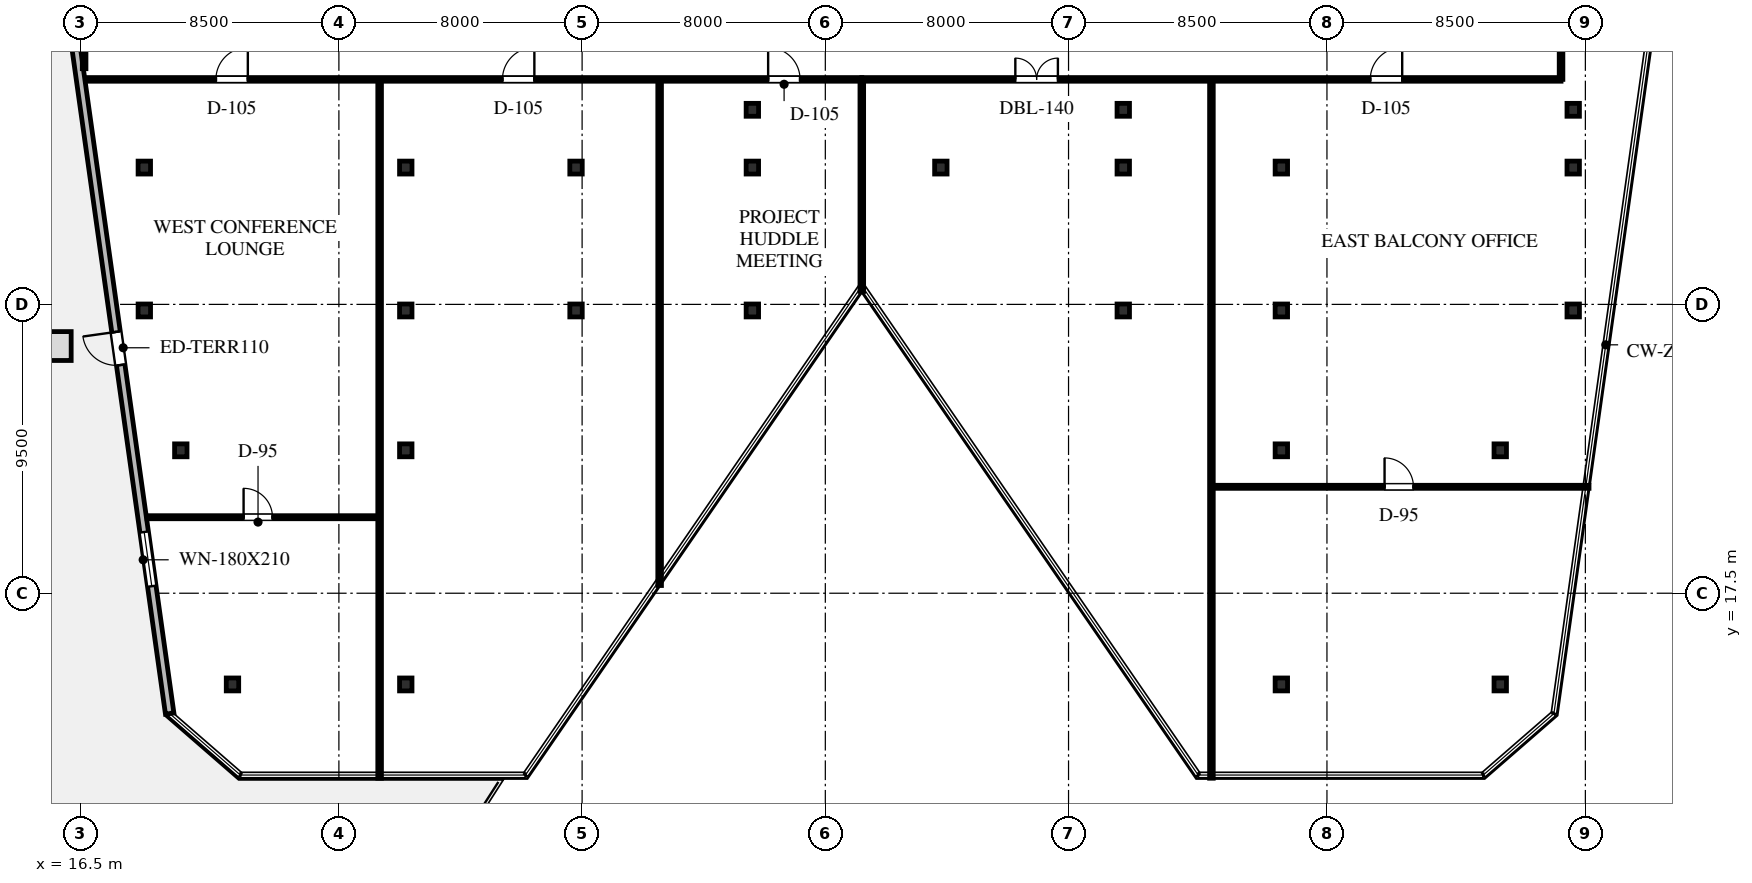
"""IFC4 building model, lengths in metres.
Left out: names, types, materials, properties, quantities, classifications, styles, units other than length and angle.
Written with IfcOpenShell. Run it as: python <this file> out.ifc"""

import sys

from ifc_helpers import new_model, si_unit, direction, frame, frame_2d, origin, origin_2d, place, context, subcontext, project, spatial, rectangle, i_section, extrude, element, fill, save


model = new_model("IFC4")
c1 = context("Model", 3, precision=1e-05, world=origin(), true_north=direction((0.0, 1.0)))
c2 = subcontext(c1, "Body", "Model", "MODEL_VIEW")
j1 = project(units=[si_unit("LENGTHUNIT", "METRE"), si_unit("PLANEANGLEUNIT", "RADIAN")], contexts=[c1])
p1 = place(None, origin())
s1 = spatial("IfcSite", under=j1, at=p1, CompositionType="ELEMENT")
p2 = place(p1, origin())
s2 = spatial("IfcBuilding", under=s1, at=p2, CompositionType="ELEMENT")
p3 = place(p2, frame((0.0, 0.0, 160.5)))
s3 = spatial("IfcBuildingStorey", under=s2, at=p3, CompositionType="ELEMENT", Elevation=160.5)
for number, where, z_axis, x_axis in (
    (1, (21.5, 14.5, 0.0), (0.0, 0.0, 1.0), (1.0, 0.0, 0.0)),
    (2, (18.6, 26.8, 0.0), (0.0, 0.0, 1.0), (1.0, 0.0, 0.0)),
    (3, (27.2, 26.8, 0.0), (0.0, 0.0, 1.0), (1.0, 0.0, 0.0)),
    (4, (32.8, 26.8, 0.0), (0.0, 0.0, 1.0), (1.0, 0.0, 0.0)),
    (5, (38.6, 26.8, 0.0), (0.0, 0.0, 1.0), (1.0, 0.0, 0.0)),
    (6, (50.8, 26.8, 0.0), (0.0, 0.0, 1.0), (1.0, 0.0, 0.0)),
    (7, (56.0, 26.8, 0.0), (0.0, 0.0, 1.0), (1.0, 0.0, 0.0)),
    (8, (65.6, 26.8, 0.0), (0.0, 0.0, 1.0), (1.0, 0.0, 0.0)),
    (9, (18.6, 31.5, 0.0), (0.0, 0.0, 1.0), (1.0, 0.0, 0.0)),
    (10, (27.2, 31.5, 0.0), (0.0, 0.0, 1.0), (1.0, 0.0, 0.0)),
    (11, (32.8, 31.5, 0.0), (0.0, 0.0, 1.0), (1.0, 0.0, 0.0)),
    (12, (27.2, 14.5, 0.0), (0.0, 0.0, 1.0), (1.0, 0.0, 0.0)),
    (13, (38.6, 31.5, 0.0), (0.0, 0.0, 1.0), (1.0, 0.0, 0.0)),
    (14, (44.8, 31.5, 0.0), (0.0, 0.0, 1.0), (1.0, 0.0, 0.0)),
    (15, (50.8, 31.5, 0.0), (0.0, 0.0, 1.0), (1.0, 0.0, 0.0)),
    (16, (56.0, 31.5, 0.0), (0.0, 0.0, 1.0), (1.0, 0.0, 0.0)),
    (17, (65.6, 31.5, 0.0), (0.0, 0.0, 1.0), (1.0, 0.0, 0.0)),
    (18, (56.0, 14.5, 0.0), (0.0, 0.0, 1.0), (1.0, 0.0, 0.0)),
    (19, (63.2, 14.5, 0.0), (0.0, 0.0, 1.0), (1.0, 0.0, 0.0)),
    (20, (19.8, 22.2, 0.0), (0.0, 0.0, 1.0), (1.0, 0.0, 0.0)),
    (21, (27.2, 22.2, 0.0), (0.0, 0.0, 1.0), (1.0, 0.0, 0.0)),
    (22, (56.0, 22.2, 0.0), (0.0, 0.0, 1.0), (1.0, 0.0, 0.0)),
    (23, (63.2, 22.2, 0.0), (0.0, 0.0, 1.0), (1.0, 0.0, 0.0)),
    (24, (38.6, 33.4, 0.0), (0.0, 0.0, 1.0), (1.0, 0.0, 0.0)),
    (25, (50.8, 33.4, 0.0), (0.0, 0.0, 1.0), (1.0, 0.0, 0.0)),
    (26, (65.6, 33.4, 0.0), (0.0, 0.0, 1.0), (1.0, 0.0, 0.0)),
):
    element("IfcColumn", number, at=place(p3, frame(where, z_axis=z_axis, x_axis=x_axis)), inside=s3, PredefinedType="COLUMN", context=c2, shape_type="SweptSolid", body=[
        extrude(i_section(OverallWidth=0.409, OverallDepth=0.425, WebThickness=0.033, FlangeThickness=0.052, FilletRadius=0.03, at=origin_2d()), origin(), (0.0, 0.0, 1.0), 4.0),
    ])
p4 = place(p3, frame((19.434, 13.541, 0.0), z_axis=(0.0, 0.0, 1.0), x_axis=(-0.139173290738, 0.99026804207, 0.0)))
e27 = element("IfcWall", 27, at=p4, inside=s3, PredefinedType="STANDARD", context=c2, shape_type="SweptSolid", body=[
    extrude(rectangle(XDim=24.498, YDim=0.28, at=frame_2d((12.249, 0.0))), origin(), (0.0, 0.0, 1.0), 3.755),
])
p5 = place(p4, frame((11.578, 0.0, 0.0)))
e28 = element("IfcOpeningElement", 28, at=p5, cuts=e27, PredefinedType="OPENING", context=c2, shape_type="SweptSolid", body=[
    extrude(rectangle(XDim=1.1, YDim=2.2, at=frame_2d((0.55, 1.1))), frame((0.0, 0.15, 0.0), z_axis=(0.0, -1.0, 0.0), x_axis=(1.0, 0.0, 0.0)), (0.0, 0.0, 1.0), 0.3),
])
p6 = place(p4, frame((4.231, 0.0, 0.65)))
e29 = element("IfcOpeningElement", 29, at=p6, cuts=e27, PredefinedType="OPENING", context=c2, shape_type="SweptSolid", body=[
    extrude(rectangle(XDim=1.8, YDim=2.1, at=frame_2d((0.9, 1.05))), frame((0.0, 0.15, 0.0), z_axis=(0.0, -1.0, 0.0), x_axis=(1.0, 0.0, 0.0)), (0.0, 0.0, 1.0), 0.3),
])
p7 = place(p3, frame((16.669, 34.4, 0.0), z_axis=(0.0, 0.0, 1.0), x_axis=(1.0, 0.0, 0.0)))
e30 = element("IfcWall", 30, at=p7, inside=s3, PredefinedType="PARTITIONING", context=c2, shape_type="SweptSolid", body=[
    extrude(rectangle(XDim=25.531, YDim=0.12, at=frame_2d((12.765, 0.0))), origin(), (0.0, 0.0, 1.0), 2.982),
])
p8 = place(p7, frame((4.285, 0.0, 0.0)))
e31 = element("IfcOpeningElement", 31, at=p8, cuts=e30, PredefinedType="OPENING", context=c2, shape_type="SweptSolid", body=[
    extrude(rectangle(XDim=1.05, YDim=2.2, at=frame_2d((0.525, 1.1))), frame((0.0, 0.07, 0.0), z_axis=(0.0, -1.0, 0.0), x_axis=(1.0, 0.0, 0.0)), (0.0, 0.0, 1.0), 0.14),
])
p9 = place(p7, frame((13.71, 0.0, 0.0)))
e32 = element("IfcOpeningElement", 32, at=p9, cuts=e30, PredefinedType="OPENING", context=c2, shape_type="SweptSolid", body=[
    extrude(rectangle(XDim=1.05, YDim=2.2, at=frame_2d((0.525, 1.1))), frame((0.0, 0.07, 0.0), z_axis=(0.0, -1.0, 0.0), x_axis=(1.0, 0.0, 0.0)), (0.0, 0.0, 1.0), 0.14),
])
p10 = place(p7, frame((22.449, 0.0, 0.0)))
e33 = element("IfcOpeningElement", 33, at=p10, cuts=e30, PredefinedType="OPENING", context=c2, shape_type="SweptSolid", body=[
    extrude(rectangle(XDim=1.05, YDim=2.2, at=frame_2d((0.525, 1.1))), frame((0.0, 0.07, 0.0), z_axis=(0.0, -1.0, 0.0), x_axis=(1.0, 0.0, 0.0)), (0.0, 0.0, 1.0), 0.14),
])
p11 = place(p3, frame((42.2, 34.4, 0.0), z_axis=(0.0, 0.0, 1.0), x_axis=(1.0, 0.0, 0.0)))
e34 = element("IfcWall", 34, at=p11, inside=s3, PredefinedType="PARTITIONING", context=c2, shape_type="SweptSolid", body=[
    extrude(rectangle(XDim=23.0, YDim=0.12, at=frame_2d((11.5, 0.0))), origin(), (0.0, 0.0, 1.0), 2.982),
])
p12 = place(p11, frame((5.05, 0.0, 0.0)))
e35 = element("IfcOpeningElement", 35, at=p12, cuts=e34, PredefinedType="OPENING", context=c2, shape_type="SweptSolid", body=[
    extrude(rectangle(XDim=1.4, YDim=2.2, at=frame_2d((0.7, 1.1))), frame((0.0, 0.07, 0.0), z_axis=(0.0, -1.0, 0.0), x_axis=(1.0, 0.0, 0.0)), (0.0, 0.0, 1.0), 0.14),
])
p13 = place(p11, frame((16.725, 0.0, 0.0)))
e36 = element("IfcOpeningElement", 36, at=p13, cuts=e34, PredefinedType="OPENING", context=c2, shape_type="SweptSolid", body=[
    extrude(rectangle(XDim=1.05, YDim=2.2, at=frame_2d((0.525, 1.1))), frame((0.0, 0.07, 0.0), z_axis=(0.0, -1.0, 0.0), x_axis=(1.0, 0.0, 0.0)), (0.0, 0.0, 1.0), 0.14),
])
p14 = place(p3, frame((16.62, 34.752, 0.0), z_axis=(0.0, 0.0, 1.0), x_axis=(0.0, 1.0, 0.0)))
e37 = element("IfcWall", 37, at=p14, inside=s3, PredefinedType="PARTITIONING", context=c2, shape_type="SweptSolid", body=[
    extrude(rectangle(XDim=3.298, YDim=0.12, at=frame_2d((1.649, 0.0))), origin(), (0.0, 0.0, 1.0), 3.755),
])
p15 = place(p3, frame((65.2, 34.4, 0.0), z_axis=(0.0, 0.0, 1.0), x_axis=(0.0, 1.0, 0.0)))
e38 = element("IfcWall", 38, at=p15, inside=s3, PredefinedType="PARTITIONING", context=c2, shape_type="SweptSolid", body=[
    extrude(rectangle(XDim=3.317, YDim=0.12, at=frame_2d((1.659, 0.0))), origin(), (0.0, 0.0, 1.0), 2.982),
])
p16 = place(p3, frame((42.2, 27.427, 0.0), z_axis=(0.0, 0.0, 1.0), x_axis=(0.0, 1.0, 0.0)))
e39 = element("IfcWall", 39, at=p16, inside=s3, PredefinedType="PARTITIONING", context=c2, shape_type="SweptSolid", body=[
    extrude(rectangle(XDim=6.973, YDim=0.12, at=frame_2d((3.487, 0.0))), origin(), (0.0, 0.0, 1.0), 2.982),
])
p17 = place(p3, frame((18.693, 20.0, 0.0), z_axis=(0.0, 0.0, 1.0), x_axis=(1.0, 0.0, 0.0)))
e40 = element("IfcWall", 40, at=p17, inside=s3, PredefinedType="PARTITIONING", context=c2, shape_type="SweptSolid", body=[
    extrude(rectangle(XDim=7.579, YDim=0.1, at=frame_2d((3.79, 0.0))), origin(), (0.0, 0.0, 1.0), 3.147),
])
p18 = place(p17, frame((3.172, 0.0, 0.0)))
e41 = element("IfcOpeningElement", 41, at=p18, cuts=e40, PredefinedType="OPENING", context=c2, shape_type="SweptSolid", body=[
    extrude(rectangle(XDim=0.95, YDim=2.15, at=frame_2d((0.475, 1.075))), frame((0.0, 0.06, 0.0), z_axis=(0.0, -1.0, 0.0), x_axis=(1.0, 0.0, 0.0)), (0.0, 0.0, 1.0), 0.12),
])
p19 = place(p3, frame((26.34, 11.415, 0.0), z_axis=(0.0, 0.0, 1.0), x_axis=(0.0, 1.0, 0.0)))
e42 = element("IfcWall", 42, at=p19, inside=s3, PredefinedType="PARTITIONING", context=c2, shape_type="SweptSolid", body=[
    extrude(rectangle(XDim=22.917, YDim=0.12, at=frame_2d((11.458, 0.0))), origin(), (0.0, 0.0, 1.0), 2.982),
])
p20 = place(p3, frame((35.55, 17.754, 0.0), z_axis=(0.0, 0.0, 1.0), x_axis=(0.0, 1.0, 0.0)))
e43 = element("IfcWall", 43, at=p20, inside=s3, PredefinedType="PARTITIONING", context=c2, shape_type="SweptSolid", body=[
    extrude(rectangle(XDim=16.578, YDim=0.12, at=frame_2d((8.289, 0.0))), origin(), (0.0, 0.0, 1.0), 2.982),
])
p21 = place(p3, frame((53.7, 11.415, 0.0), z_axis=(0.0, 0.0, 1.0), x_axis=(0.0, 1.0, 0.0)))
e44 = element("IfcWall", 44, at=p21, inside=s3, PredefinedType="PARTITIONING", context=c2, shape_type="SweptSolid", body=[
    extrude(rectangle(XDim=22.917, YDim=0.12, at=frame_2d((11.458, 0.0))), origin(), (0.0, 0.0, 1.0), 2.982),
])
p22 = place(p3, frame((53.768, 21.0, 0.0), z_axis=(0.0, 0.0, 1.0), x_axis=(1.0, 0.0, 0.0)))
e45 = element("IfcWall", 45, at=p22, inside=s3, PredefinedType="PARTITIONING", context=c2, shape_type="SweptSolid", body=[
    extrude(rectangle(XDim=12.352, YDim=0.1, at=frame_2d((6.176, 0.0))), origin(), (0.0, 0.0, 1.0), 2.982),
])
p23 = place(p22, frame((5.627, 0.0, 0.0)))
e46 = element("IfcOpeningElement", 46, at=p23, cuts=e45, PredefinedType="OPENING", context=c2, shape_type="SweptSolid", body=[
    extrude(rectangle(XDim=0.95, YDim=2.15, at=frame_2d((0.475, 1.075))), frame((0.0, 0.06, 0.0), z_axis=(0.0, -1.0, 0.0), x_axis=(1.0, 0.0, 0.0)), (0.0, 0.0, 1.0), 0.12),
])
p24 = place(p5, origin())
e47 = element("IfcDoor", 47, at=p24, inside=s3, OperationType="SINGLE_SWING_RIGHT", PredefinedType="DOOR", context=c2, shape_type="SweptSolid", body=[
    extrude(rectangle(XDim=1.1, YDim=2.2, at=frame_2d((0.55, 1.1))), frame((0.0, 0.025, 0.0), z_axis=(0.0, -1.0, 0.0), x_axis=(1.0, 0.0, 0.0)), (0.0, 0.0, 1.0), 0.05),
])
fill(e28, e47)
p25 = place(p6, origin())
e48 = element("IfcWindow", 48, at=p25, inside=s3, PartitioningType="SINGLE_PANEL", PredefinedType="WINDOW", context=c2, shape_type="SweptSolid", body=[
    extrude(rectangle(XDim=1.8, YDim=2.1, at=frame_2d((0.9, 1.05))), frame((0.0, 0.03, 0.0), z_axis=(0.0, -1.0, 0.0), x_axis=(1.0, 0.0, 0.0)), (0.0, 0.0, 1.0), 0.06),
])
fill(e29, e48)
p26 = place(p8, origin())
e49 = element("IfcDoor", 49, at=p26, inside=s3, OperationType="SINGLE_SWING_RIGHT", PredefinedType="DOOR", context=c2, shape_type="SweptSolid", body=[
    extrude(rectangle(XDim=1.05, YDim=2.2, at=frame_2d((0.525, 1.1))), frame((0.0, 0.025, 0.0), z_axis=(0.0, -1.0, 0.0), x_axis=(1.0, 0.0, 0.0)), (0.0, 0.0, 1.0), 0.05),
])
fill(e31, e49)
p27 = place(p18, origin())
e50 = element("IfcDoor", 50, at=p27, inside=s3, OperationType="SINGLE_SWING_LEFT", PredefinedType="DOOR", context=c2, shape_type="SweptSolid", body=[
    extrude(rectangle(XDim=0.95, YDim=2.15, at=frame_2d((0.475, 1.075))), frame((0.0, 0.025, 0.0), z_axis=(0.0, -1.0, 0.0), x_axis=(1.0, 0.0, 0.0)), (0.0, 0.0, 1.0), 0.05),
])
fill(e41, e50)
p28 = place(p9, origin())
e51 = element("IfcDoor", 51, at=p28, inside=s3, OperationType="SINGLE_SWING_RIGHT", PredefinedType="DOOR", context=c2, shape_type="SweptSolid", body=[
    extrude(rectangle(XDim=1.05, YDim=2.2, at=frame_2d((0.525, 1.1))), frame((0.0, 0.025, 0.0), z_axis=(0.0, -1.0, 0.0), x_axis=(1.0, 0.0, 0.0)), (0.0, 0.0, 1.0), 0.05),
])
fill(e32, e51)
p29 = place(p10, origin())
e52 = element("IfcDoor", 52, at=p29, inside=s3, OperationType="SINGLE_SWING_LEFT", PredefinedType="DOOR", context=c2, shape_type="SweptSolid", body=[
    extrude(rectangle(XDim=1.05, YDim=2.2, at=frame_2d((0.525, 1.1))), frame((0.0, 0.025, 0.0), z_axis=(0.0, -1.0, 0.0), x_axis=(1.0, 0.0, 0.0)), (0.0, 0.0, 1.0), 0.05),
])
fill(e33, e52)
p30 = place(p12, origin())
e53 = element("IfcDoor", 53, at=p30, inside=s3, OperationType="DOUBLE_DOOR_SINGLE_SWING", PredefinedType="DOOR", context=c2, shape_type="SweptSolid", body=[
    extrude(rectangle(XDim=1.4, YDim=2.2, at=frame_2d((0.7, 1.1))), frame((0.0, 0.025, 0.0), z_axis=(0.0, -1.0, 0.0), x_axis=(1.0, 0.0, 0.0)), (0.0, 0.0, 1.0), 0.05),
])
fill(e35, e53)
p31 = place(p13, origin())
e54 = element("IfcDoor", 54, at=p31, inside=s3, OperationType="SINGLE_SWING_RIGHT", PredefinedType="DOOR", context=c2, shape_type="SweptSolid", body=[
    extrude(rectangle(XDim=1.05, YDim=2.2, at=frame_2d((0.525, 1.1))), frame((0.0, 0.025, 0.0), z_axis=(0.0, -1.0, 0.0), x_axis=(1.0, 0.0, 0.0)), (0.0, 0.0, 1.0), 0.05),
])
fill(e36, e54)
p32 = place(p23, origin())
e55 = element("IfcDoor", 55, at=p32, inside=s3, OperationType="SINGLE_SWING_LEFT", PredefinedType="DOOR", context=c2, shape_type="SweptSolid", body=[
    extrude(rectangle(XDim=0.95, YDim=2.15, at=frame_2d((0.475, 1.075))), frame((0.0, 0.025, 0.0), z_axis=(0.0, -1.0, 0.0), x_axis=(1.0, 0.0, 0.0)), (0.0, 0.0, 1.0), 0.05),
])
fill(e46, e55)
save(model, sys.argv[1])
